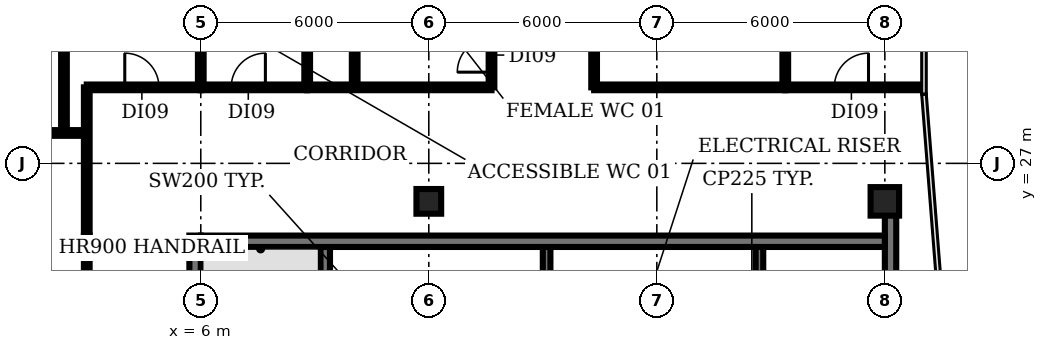
"""IFC4 building model, lengths in metres.
Left out: names, types, materials, properties, quantities, classifications, styles, units other than length and angle.
Written with IfcOpenShell. Run it as: python <this file> out.ifc"""

import sys

from ifc_helpers import new_model, si_unit, direction, frame, frame_2d, origin, origin_2d, place, context, subcontext, project, spatial, rectangle, extrude, element, fill, save


model = new_model("IFC4")
c1 = context("Model", 3, precision=1e-05, world=origin(), true_north=direction((0.0, 1.0)))
c2 = subcontext(c1, "Body", "Model", "MODEL_VIEW")
j1 = project(units=[si_unit("LENGTHUNIT", "METRE"), si_unit("PLANEANGLEUNIT", "RADIAN")], contexts=[c1])
p1 = place(None, origin())
s1 = spatial("IfcSite", under=j1, at=p1, CompositionType="ELEMENT")
p2 = place(p1, origin())
s2 = spatial("IfcBuilding", under=s1, at=p2, CompositionType="ELEMENT")
p3 = place(p2, frame((0.0, 0.0, 306.2)))
s3 = spatial("IfcBuildingStorey", under=s2, at=p3, CompositionType="ELEMENT", Elevation=306.2)
p4 = place(p3, frame((12.0, 26.0, 0.0), z_axis=(0.0, 0.0, 1.0), x_axis=(1.0, 0.0, 0.0)))
e1 = element("IfcColumn", 1, at=p4, inside=s3, PredefinedType="COLUMN", context=c2, shape_type="SweptSolid", body=[
    extrude(rectangle(XDim=0.65, YDim=0.65, at=origin_2d()), origin(), (0.0, 0.0, 1.0), 3.85),
])
p5 = place(p3, frame((24.0, 26.0, 0.0), z_axis=(0.0, 0.0, 1.0), x_axis=(1.0, 0.0, 0.0)))
e2 = element("IfcColumn", 2, at=p5, inside=s3, PredefinedType="COLUMN", context=c2, shape_type="SweptSolid", body=[
    extrude(rectangle(XDim=0.75, YDim=0.75, at=origin_2d()), origin(), (0.0, 0.0, 1.0), 3.85),
])
p6 = place(p3, frame((9.275, 18.375, 0.0), z_axis=(0.0, 0.0, 1.0), x_axis=(0.0, 1.0, 0.0)))
e3 = element("IfcWall", 3, at=p6, inside=s3, PredefinedType="SHEAR", context=c2, shape_type="SweptSolid", body=[
    extrude(rectangle(XDim=6.425, YDim=0.25, at=frame_2d((3.212, 0.0))), origin(), (0.0, 0.0, 1.0), 3.85),
])
for number, where, z_axis, x_axis in (
    (4, (15.1, 22.9, 0.0), (0.0, 0.0, 1.0), (0.0, 1.0, 0.0)),
    (5, (20.7, 22.9, 0.0), (0.0, 0.0, 1.0), (0.0, 1.0, 0.0)),
):
    element("IfcWall", number, at=place(p3, frame(where, z_axis=z_axis, x_axis=x_axis)), inside=s3, PredefinedType="SHEAR", context=c2, shape_type="SweptSolid", body=[
        extrude(rectangle(XDim=1.9, YDim=0.2, at=frame_2d((0.95, 0.0))), origin(), (0.0, 0.0, 1.0), 3.85),
    ])
p7 = place(p3, frame((5.85, 5.1, 0.0), z_axis=(0.0, 0.0, 1.0), x_axis=(0.0, 1.0, 0.0)))
e6 = element("IfcWall", 6, at=p7, inside=s3, PredefinedType="SHEAR", context=c2, shape_type="SweptSolid", body=[
    extrude(rectangle(XDim=20.0, YDim=0.3, at=frame_2d((10.0, 0.0))), origin(), (0.0, 0.0, 1.0), 3.85),
])
p8 = place(p7, frame((0.55, 0.0, 0.0)))
e7 = element("IfcOpeningElement", 7, at=p8, cuts=e6, PredefinedType="OPENING", context=c2, shape_type="SweptSolid", body=[
    extrude(rectangle(XDim=1.5, YDim=2.1, at=frame_2d((0.75, 1.05))), frame((0.0, 0.16, 0.0), z_axis=(0.0, -1.0, 0.0), x_axis=(1.0, 0.0, 0.0)), (0.0, 0.0, 1.0), 0.32),
])
p9 = place(p7, frame((7.0, 0.0, 0.0)))
e8 = element("IfcOpeningElement", 8, at=p9, cuts=e6, PredefinedType="OPENING", context=c2, shape_type="SweptSolid", body=[
    extrude(rectangle(XDim=1.2, YDim=2.1, at=frame_2d((0.6, 1.05))), frame((0.0, 0.16, 0.0), z_axis=(0.0, -1.0, 0.0), x_axis=(1.0, 0.0, 0.0)), (0.0, 0.0, 1.0), 0.32),
])
p10 = place(p7, frame((13.55, 0.0, 0.0)))
e9 = element("IfcOpeningElement", 9, at=p10, cuts=e6, PredefinedType="OPENING", context=c2, shape_type="SweptSolid", body=[
    extrude(rectangle(XDim=1.2, YDim=2.1, at=frame_2d((0.6, 1.05))), frame((0.0, 0.16, 0.0), z_axis=(0.0, -1.0, 0.0), x_axis=(1.0, 0.0, 0.0)), (0.0, 0.0, 1.0), 0.32),
])
p11 = place(p3, frame((24.15, 25.655, 0.0), z_axis=(0.0, 0.0, 1.0), x_axis=(0.0, -1.0, 0.0)))
e10 = element("IfcWall", 10, at=p11, inside=s3, PredefinedType="SHEAR", context=c2, shape_type="SweptSolid", body=[
    extrude(rectangle(XDim=20.555, YDim=0.3, at=frame_2d((10.277, 0.0))), origin(), (0.0, 0.0, 1.0), 3.85),
])
p12 = place(p11, frame((18.505, 0.0, 0.0)))
e11 = element("IfcOpeningElement", 11, at=p12, cuts=e10, PredefinedType="OPENING", context=c2, shape_type="SweptSolid", body=[
    extrude(rectangle(XDim=1.5, YDim=2.1, at=frame_2d((0.75, 1.05))), frame((0.0, 0.16, 0.0), z_axis=(0.0, -1.0, 0.0), x_axis=(1.0, 0.0, 0.0)), (0.0, 0.0, 1.0), 0.32),
])
p13 = place(p11, frame((12.405, 0.0, 0.0)))
e12 = element("IfcOpeningElement", 12, at=p13, cuts=e10, PredefinedType="OPENING", context=c2, shape_type="SweptSolid", body=[
    extrude(rectangle(XDim=0.9, YDim=2.1, at=frame_2d((0.45, 1.05))), frame((0.0, 0.16, 0.0), z_axis=(0.0, -1.0, 0.0), x_axis=(1.0, 0.0, 0.0)), (0.0, 0.0, 1.0), 0.32),
])
p14 = place(p11, frame((6.405, 0.0, 0.0)))
e13 = element("IfcOpeningElement", 13, at=p14, cuts=e10, PredefinedType="OPENING", context=c2, shape_type="SweptSolid", body=[
    extrude(rectangle(XDim=2.0, YDim=2.1, at=frame_2d((1.0, 1.05))), frame((0.0, 0.16, 0.0), z_axis=(0.0, -1.0, 0.0), x_axis=(1.0, 0.0, 0.0)), (0.0, 0.0, 1.0), 0.32),
])
p15 = place(p3, frame((6.0, 24.95, 0.0), z_axis=(0.0, 0.0, 1.0), x_axis=(1.0, 0.0, 0.0)))
e14 = element("IfcWall", 14, at=p15, inside=s3, PredefinedType="SHEAR", context=c2, shape_type="SweptSolid", body=[
    extrude(rectangle(XDim=18.0, YDim=0.3, at=frame_2d((9.0, 0.0))), origin(), (0.0, 0.0, 1.0), 3.85),
])
p16 = place(p3, frame((-0.967, 27.8, 0.0), z_axis=(0.0, 0.0, 1.0), x_axis=(1.0, 0.0, 0.0)))
e15 = element("IfcWall", 15, at=p16, inside=s3, PredefinedType="PARTITIONING", context=c2, shape_type="SweptSolid", body=[
    extrude(rectangle(XDim=3.967, YDim=0.15, at=frame_2d((1.984, 0.0))), origin(), (0.0, 0.0, 1.0), 2.9),
])
p17 = place(p3, frame((2.4, 27.8, 0.0), z_axis=(0.0, 0.0, 1.0), x_axis=(0.0, 1.0, 0.0)))
e16 = element("IfcWall", 16, at=p17, inside=s3, PredefinedType="PARTITIONING", context=c2, shape_type="SweptSolid", body=[
    extrude(rectangle(XDim=6.0, YDim=0.15, at=frame_2d((3.0, 0.0))), origin(), (0.0, 0.0, 1.0), 2.9),
])
p18 = place(p3, frame((3.0, 5.1, 0.0), z_axis=(0.0, 0.0, 1.0), x_axis=(0.0, 1.0, 0.0)))
e17 = element("IfcWall", 17, at=p18, inside=s3, PredefinedType="PARTITIONING", context=c2, shape_type="SweptSolid", body=[
    extrude(rectangle(XDim=20.0, YDim=0.15, at=frame_2d((10.0, 0.0))), origin(), (0.0, 0.0, 1.0), 2.9),
])
p19 = place(p18, frame((9.3, 0.0, 0.0)))
e18 = element("IfcOpeningElement", 18, at=p19, cuts=e17, PredefinedType="OPENING", context=c2, shape_type="SweptSolid", body=[
    extrude(rectangle(XDim=1.2, YDim=2.1, at=frame_2d((0.6, 1.05))), frame((0.0, 0.085, 0.0), z_axis=(0.0, -1.0, 0.0), x_axis=(1.0, 0.0, 0.0)), (0.0, 0.0, 1.0), 0.17),
])
p20 = place(p3, frame((3.0, 25.1, 0.0), z_axis=(0.0, 0.0, 1.0), x_axis=(0.0, 1.0, 0.0)))
e19 = element("IfcWall", 19, at=p20, inside=s3, PredefinedType="PARTITIONING", context=c2, shape_type="SweptSolid", body=[
    extrude(rectangle(XDim=3.9, YDim=0.15, at=frame_2d((1.95, 0.0))), origin(), (0.0, 0.0, 1.0), 2.9),
])
p21 = place(p3, frame((3.0, 29.0, 0.0), z_axis=(0.0, 0.0, 1.0), x_axis=(1.0, 0.0, 0.0)))
e20 = element("IfcWall", 20, at=p21, inside=s3, PredefinedType="PARTITIONING", context=c2, shape_type="SweptSolid", body=[
    extrude(rectangle(XDim=3.0, YDim=0.15, at=frame_2d((1.5, 0.0))), origin(), (0.0, 0.0, 1.0), 2.9),
])
p22 = place(p21, frame((1.0, 0.0, 0.0)))
e21 = element("IfcOpeningElement", 21, at=p22, cuts=e20, PredefinedType="OPENING", context=c2, shape_type="SweptSolid", body=[
    extrude(rectangle(XDim=0.9, YDim=2.1, at=frame_2d((0.45, 1.05))), frame((0.0, 0.085, 0.0), z_axis=(0.0, -1.0, 0.0), x_axis=(1.0, 0.0, 0.0)), (0.0, 0.0, 1.0), 0.17),
])
p23 = place(p3, frame((6.0, 29.0, 0.0), z_axis=(0.0, 0.0, 1.0), x_axis=(0.0, 1.0, 0.0)))
e22 = element("IfcWall", 22, at=p23, inside=s3, PredefinedType="PARTITIONING", context=c2, shape_type="SweptSolid", body=[
    extrude(rectangle(XDim=4.8, YDim=0.15, at=frame_2d((2.4, 0.0))), origin(), (0.0, 0.0, 1.0), 2.9),
])
p24 = place(p3, frame((6.0, 29.0, 0.0), z_axis=(0.0, 0.0, 1.0), x_axis=(1.0, 0.0, 0.0)))
e23 = element("IfcWall", 23, at=p24, inside=s3, PredefinedType="PARTITIONING", context=c2, shape_type="SweptSolid", body=[
    extrude(rectangle(XDim=2.8, YDim=0.15, at=frame_2d((1.4, 0.0))), origin(), (0.0, 0.0, 1.0), 2.9),
])
p25 = place(p24, frame((0.8, 0.0, 0.0)))
e24 = element("IfcOpeningElement", 24, at=p25, cuts=e23, PredefinedType="OPENING", context=c2, shape_type="SweptSolid", body=[
    extrude(rectangle(XDim=0.9, YDim=2.1, at=frame_2d((0.45, 1.05))), frame((0.0, 0.085, 0.0), z_axis=(0.0, -1.0, 0.0), x_axis=(1.0, 0.0, 0.0)), (0.0, 0.0, 1.0), 0.17),
])
p26 = place(p3, frame((8.8, 29.0, 0.0), z_axis=(0.0, 0.0, 1.0), x_axis=(0.0, 1.0, 0.0)))
e25 = element("IfcWall", 25, at=p26, inside=s3, PredefinedType="PARTITIONING", context=c2, shape_type="SweptSolid", body=[
    extrude(rectangle(XDim=4.8, YDim=0.15, at=frame_2d((2.4, 0.0))), origin(), (0.0, 0.0, 1.0), 2.9),
])
p27 = place(p3, frame((8.8, 29.0, 0.0), z_axis=(0.0, 0.0, 1.0), x_axis=(1.0, 0.0, 0.0)))
e26 = element("IfcWall", 26, at=p27, inside=s3, PredefinedType="PARTITIONING", context=c2, shape_type="SweptSolid", body=[
    extrude(rectangle(XDim=4.85, YDim=0.15, at=frame_2d((2.425, 0.0))), origin(), (0.0, 0.0, 1.0), 2.9),
])
p28 = place(p3, frame((10.05, 29.0, 0.0), z_axis=(0.0, 0.0, 1.0), x_axis=(0.0, 1.0, 0.0)))
e27 = element("IfcWall", 27, at=p28, inside=s3, PredefinedType="PARTITIONING", context=c2, shape_type="SweptSolid", body=[
    extrude(rectangle(XDim=4.8, YDim=0.15, at=frame_2d((2.4, 0.0))), origin(), (0.0, 0.0, 1.0), 2.9),
])
p29 = place(p3, frame((13.65, 29.0, 0.0), z_axis=(0.0, 0.0, 1.0), x_axis=(0.0, 1.0, 0.0)))
e28 = element("IfcWall", 28, at=p29, inside=s3, PredefinedType="PARTITIONING", context=c2, shape_type="SweptSolid", body=[
    extrude(rectangle(XDim=4.8, YDim=0.15, at=frame_2d((2.4, 0.0))), origin(), (0.0, 0.0, 1.0), 2.9),
])
p30 = place(p29, frame((0.4, 0.0, 0.0)))
e29 = element("IfcOpeningElement", 29, at=p30, cuts=e28, PredefinedType="OPENING", context=c2, shape_type="SweptSolid", body=[
    extrude(rectangle(XDim=0.9, YDim=2.1, at=frame_2d((0.45, 1.05))), frame((0.0, 0.085, 0.0), z_axis=(0.0, -1.0, 0.0), x_axis=(1.0, 0.0, 0.0)), (0.0, 0.0, 1.0), 0.17),
])
p31 = place(p3, frame((16.35, 29.0, 0.0), z_axis=(0.0, 0.0, 1.0), x_axis=(0.0, 1.0, 0.0)))
e30 = element("IfcWall", 30, at=p31, inside=s3, PredefinedType="PARTITIONING", context=c2, shape_type="SweptSolid", body=[
    extrude(rectangle(XDim=4.8, YDim=0.15, at=frame_2d((2.4, 0.0))), origin(), (0.0, 0.0, 1.0), 2.9),
])
p32 = place(p3, frame((16.35, 29.0, 0.0), z_axis=(0.0, 0.0, 1.0), x_axis=(1.0, 0.0, 0.0)))
e31 = element("IfcWall", 31, at=p32, inside=s3, PredefinedType="PARTITIONING", context=c2, shape_type="SweptSolid", body=[
    extrude(rectangle(XDim=5.03, YDim=0.15, at=frame_2d((2.515, 0.0))), origin(), (0.0, 0.0, 1.0), 2.9),
])
p33 = place(p3, frame((21.38, 29.0, 0.0), z_axis=(0.0, 0.0, 1.0), x_axis=(0.0, 1.0, 0.0)))
e32 = element("IfcWall", 32, at=p33, inside=s3, PredefinedType="PARTITIONING", context=c2, shape_type="SweptSolid", body=[
    extrude(rectangle(XDim=4.8, YDim=0.15, at=frame_2d((2.4, 0.0))), origin(), (0.0, 0.0, 1.0), 2.9),
])
p34 = place(p3, frame((21.38, 29.0, 0.0), z_axis=(0.0, 0.0, 1.0), x_axis=(1.0, 0.0, 0.0)))
e33 = element("IfcWall", 33, at=p34, inside=s3, PredefinedType="PARTITIONING", context=c2, shape_type="SweptSolid", body=[
    extrude(rectangle(XDim=3.59, YDim=0.15, at=frame_2d((1.795, 0.0))), origin(), (0.0, 0.0, 1.0), 2.9),
])
p35 = place(p34, frame((1.29, 0.0, 0.0)))
e34 = element("IfcOpeningElement", 34, at=p35, cuts=e33, PredefinedType="OPENING", context=c2, shape_type="SweptSolid", body=[
    extrude(rectangle(XDim=0.9, YDim=2.1, at=frame_2d((0.45, 1.05))), frame((0.0, 0.085, 0.0), z_axis=(0.0, -1.0, 0.0), x_axis=(1.0, 0.0, 0.0)), (0.0, 0.0, 1.0), 0.17),
])
p36 = place(p22, origin())
e35 = element("IfcDoor", 35, at=p36, inside=s3, OperationType="SINGLE_SWING_LEFT", PredefinedType="DOOR", context=c2, shape_type="SweptSolid", body=[
    extrude(rectangle(XDim=0.9, YDim=2.1, at=frame_2d((0.45, 1.05))), frame((0.0, 0.025, 0.0), z_axis=(0.0, -1.0, 0.0), x_axis=(1.0, 0.0, 0.0)), (0.0, 0.0, 1.0), 0.05),
])
fill(e21, e35)
p37 = place(p25, origin())
e36 = element("IfcDoor", 36, at=p37, inside=s3, OperationType="SINGLE_SWING_RIGHT", PredefinedType="DOOR", context=c2, shape_type="SweptSolid", body=[
    extrude(rectangle(XDim=0.9, YDim=2.1, at=frame_2d((0.45, 1.05))), frame((0.0, 0.025, 0.0), z_axis=(0.0, -1.0, 0.0), x_axis=(1.0, 0.0, 0.0)), (0.0, 0.0, 1.0), 0.05),
])
fill(e24, e36)
p38 = place(p30, origin())
e37 = element("IfcDoor", 37, at=p38, inside=s3, OperationType="SINGLE_SWING_LEFT", PredefinedType="DOOR", context=c2, shape_type="SweptSolid", body=[
    extrude(rectangle(XDim=0.9, YDim=2.1, at=frame_2d((0.45, 1.05))), frame((0.0, 0.025, 0.0), z_axis=(0.0, -1.0, 0.0), x_axis=(1.0, 0.0, 0.0)), (0.0, 0.0, 1.0), 0.05),
])
fill(e29, e37)
p39 = place(p35, origin())
e38 = element("IfcDoor", 38, at=p39, inside=s3, OperationType="SINGLE_SWING_RIGHT", PredefinedType="DOOR", context=c2, shape_type="SweptSolid", body=[
    extrude(rectangle(XDim=0.9, YDim=2.1, at=frame_2d((0.45, 1.05))), frame((0.0, 0.025, 0.0), z_axis=(0.0, -1.0, 0.0), x_axis=(1.0, 0.0, 0.0)), (0.0, 0.0, 1.0), 0.05),
])
fill(e34, e38)
save(model, sys.argv[1])
